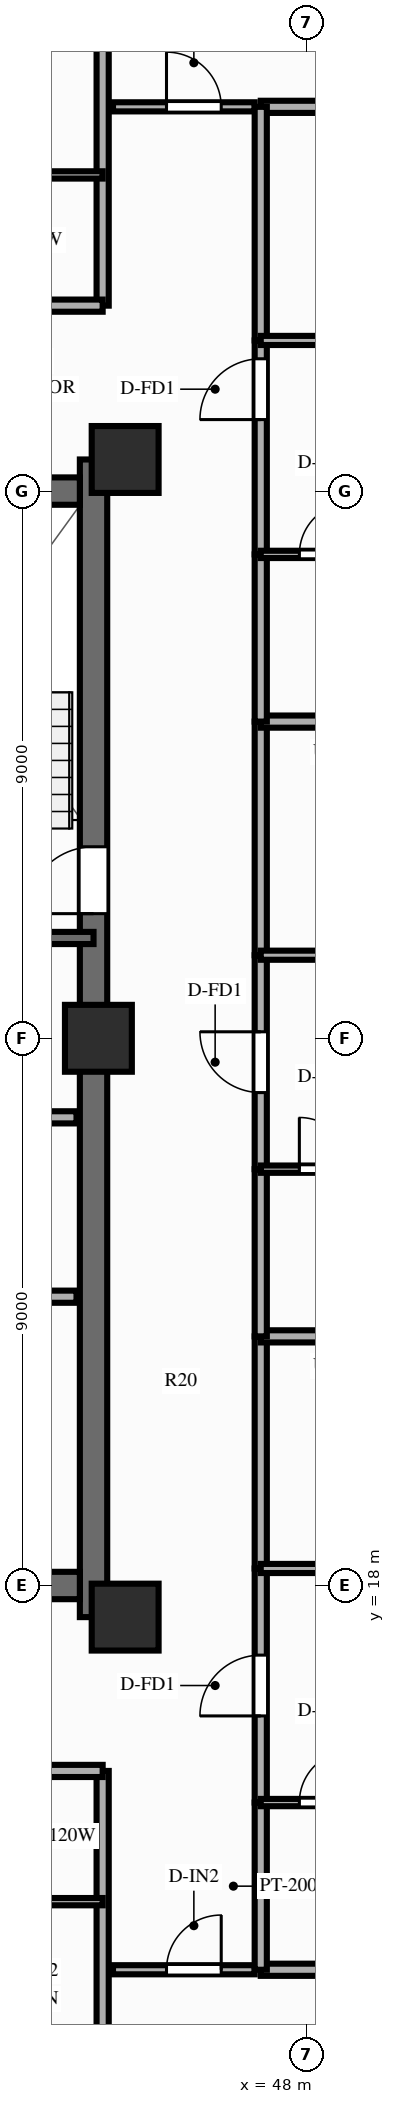
"""IFC4 building model, lengths in metres.
Left out: names, types, materials, properties, quantities, classifications, styles, units other than length and angle.
Written with IfcOpenShell. Run it as: python <this file> out.ifc"""

import sys

from ifc_helpers import new_model, si_unit, direction, frame, frame_2d, origin, origin_2d, place, context, subcontext, project, spatial, rectangle, extrude, source, transform, mapped, element, fill, save


model = new_model("IFC4")
c1 = context("Model", 3, precision=1e-05, world=origin(), true_north=direction((0.0, 1.0)))
c2 = subcontext(c1, "Body", "Model", "MODEL_VIEW")
j1 = project(units=[si_unit("LENGTHUNIT", "METRE"), si_unit("PLANEANGLEUNIT", "RADIAN")], contexts=[c1])
p1 = place(None, origin())
s1 = spatial("IfcSite", under=j1, at=p1, CompositionType="ELEMENT")
p2 = place(p1, origin())
s2 = spatial("IfcBuilding", under=s1, at=p2, CompositionType="ELEMENT")
p3 = place(p2, frame((0.0, 0.0, 196.6)))
s3 = spatial("IfcBuildingStorey", under=s2, at=p3, CompositionType="ELEMENT", Elevation=196.6)
p4 = place(p3, frame((44.5, 17.48, 0.0), z_axis=(0.0, 0.0, 1.0), x_axis=(0.0, 1.0, 0.0)))
e1 = element("IfcWall", 1, at=p4, inside=s3, PredefinedType="SHEAR", context=c2, shape_type="SweptSolid", body=[
    extrude(rectangle(XDim=19.04, YDim=0.45, at=frame_2d((9.52, 0.0))), origin(), (0.0, 0.0, 1.0), 3.0),
])
p5 = place(p4, frame((12.67, 0.0, 0.0), z_axis=(0.0, 0.0, 1.0), x_axis=(-1.0, 0.0, 0.0)))
e2 = element("IfcOpeningElement", 2, at=p5, cuts=e1, PredefinedType="OPENING", context=c2, shape_type="SweptSolid", body=[
    extrude(rectangle(XDim=1.1, YDim=2.15, at=frame_2d((0.55, 1.075))), frame((0.0, 0.237, 0.0), z_axis=(0.0, -1.0, 0.0), x_axis=(1.0, 0.0, 0.0)), (0.0, 0.0, 1.0), 0.474),
])
p6 = place(p3, frame((31.725, 18.0, 0.0), z_axis=(0.0, 0.0, 1.0), x_axis=(1.0, 0.0, 0.0)))
e3 = element("IfcWall", 3, at=p6, inside=s3, PredefinedType="SHEAR", context=c2, shape_type="SweptSolid", body=[
    extrude(rectangle(XDim=12.55, YDim=0.45, at=frame_2d((6.275, 0.0))), origin(), (0.0, 0.0, 1.0), 3.0),
])
p7 = place(p3, frame((31.725, 36.0, 0.0), z_axis=(0.0, 0.0, 1.0), x_axis=(1.0, 0.0, 0.0)))
e4 = element("IfcWall", 4, at=p7, inside=s3, PredefinedType="SHEAR", context=c2, shape_type="SweptSolid", body=[
    extrude(rectangle(XDim=12.55, YDim=0.45, at=frame_2d((6.275, 0.0))), origin(), (0.0, 0.0, 1.0), 3.0),
])
p8 = place(p7, frame((5.225, 0.0, 0.0), z_axis=(0.0, 0.0, 1.0), x_axis=(-1.0, 0.0, 0.0)))
e5 = element("IfcOpeningElement", 5, at=p8, cuts=e4, PredefinedType="OPENING", context=c2, shape_type="SweptSolid", body=[
    extrude(rectangle(XDim=1.4, YDim=2.15, at=frame_2d((0.7, 1.075))), frame((0.0, 0.237, 0.0), z_axis=(0.0, -1.0, 0.0), x_axis=(1.0, 0.0, 0.0)), (0.0, 0.0, 1.0), 0.474),
])
m1 = source(origin(), c2, "Body", "SweptSolid", [
    extrude(rectangle(XDim=1.1, YDim=1.1, at=origin_2d()), origin(), (0.0, 0.0, 1.0), 3.0),
])
for number, where, z_axis, x_axis in (
    (6, (45.02, 17.48, 0.0), (0.0, 0.0, 1.0), (1.0, 0.0, 0.0)),
    (7, (45.02, 36.52, 0.0), (0.0, 0.0, 1.0), (1.0, 0.0, 0.0)),
    (8, (44.58, 27.0, 0.0), (0.0, 0.0, 1.0), (1.0, 0.0, 0.0)),
):
    element("IfcColumn", number, at=place(p3, frame(where, z_axis=z_axis, x_axis=x_axis)), inside=s3, PredefinedType="COLUMN", context=c2, shape_type="MappedRepresentation", body=[
        mapped(m1, transform((0.0, 0.0, 0.0), scale=1.0)),
    ])
p9 = place(p3, frame((41.55, 22.75, 0.0), z_axis=(0.0, 0.0, 1.0), x_axis=(1.0, 0.0, 0.0)))
e9 = element("IfcWall", 9, at=p9, inside=s3, PredefinedType="PARTITIONING", context=c2, shape_type="SweptSolid", body=[
    extrude(rectangle(XDim=2.67, YDim=0.2, at=frame_2d((1.335, 0.0))), origin(), (0.0, 0.0, 1.0), 2.79),
])
p10 = place(p3, frame((41.55, 25.7, 0.0), z_axis=(0.0, 0.0, 1.0), x_axis=(1.0, 0.0, 0.0)))
e10 = element("IfcWall", 10, at=p10, inside=s3, PredefinedType="PARTITIONING", context=c2, shape_type="SweptSolid", body=[
    extrude(rectangle(XDim=2.67, YDim=0.2, at=frame_2d((1.335, 0.0))), origin(), (0.0, 0.0, 1.0), 2.14),
])
p11 = place(p3, frame((40.57, 28.65, 0.0), z_axis=(0.0, 0.0, 1.0), x_axis=(1.0, 0.0, 0.0)))
e11 = element("IfcWall", 11, at=p11, inside=s3, PredefinedType="SOLIDWALL", context=c2, shape_type="SweptSolid", body=[
    extrude(rectangle(XDim=3.93, YDim=0.2, at=frame_2d((1.965, 0.0))), origin(), (0.0, 0.0, 1.0), 2.79),
])
p12 = place(p3, frame((44.82, 11.68, 0.0), z_axis=(0.0, 0.0, 1.0), x_axis=(1.0, 0.0, 0.0)))
e12 = element("IfcWall", 12, at=p12, inside=s3, PredefinedType="PARTITIONING", context=c2, shape_type="SweptSolid", body=[
    extrude(rectangle(XDim=2.33, YDim=0.15, at=frame_2d((1.165, 0.0))), origin(), (0.0, 0.0, 1.0), 2.79),
])
p13 = place(p12, frame((0.88, 0.0, 0.0)))
e13 = element("IfcOpeningElement", 13, at=p13, cuts=e12, PredefinedType="OPENING", context=c2, shape_type="SweptSolid", body=[
    extrude(rectangle(XDim=0.9, YDim=2.1, at=frame_2d((0.45, 1.05))), frame((0.0, 0.087, 0.0), z_axis=(0.0, -1.0, 0.0), x_axis=(1.0, 0.0, 0.0)), (0.0, 0.0, 1.0), 0.174),
])
p14 = place(p3, frame((44.82, 42.32, 0.0), z_axis=(0.0, 0.0, 1.0), x_axis=(1.0, 0.0, 0.0)))
e14 = element("IfcWall", 14, at=p14, inside=s3, PredefinedType="PARTITIONING", context=c2, shape_type="SweptSolid", body=[
    extrude(rectangle(XDim=2.33, YDim=0.15, at=frame_2d((1.165, 0.0))), origin(), (0.0, 0.0, 1.0), 2.79),
])
p15 = place(p14, frame((0.88, 0.0, 0.0)))
e15 = element("IfcOpeningElement", 15, at=p15, cuts=e14, PredefinedType="OPENING", context=c2, shape_type="SweptSolid", body=[
    extrude(rectangle(XDim=0.9, YDim=2.1, at=frame_2d((0.45, 1.05))), frame((0.0, 0.087, 0.0), z_axis=(0.0, -1.0, 0.0), x_axis=(1.0, 0.0, 0.0)), (0.0, 0.0, 1.0), 0.174),
])
p16 = place(p3, frame((44.65, 14.95, 0.0), z_axis=(0.0, 0.0, 1.0), x_axis=(0.0, -1.0, 0.0)))
e16 = element("IfcWall", 16, at=p16, inside=s3, PredefinedType="PARTITIONING", context=c2, shape_type="SweptSolid", body=[
    extrude(rectangle(XDim=8.8, YDim=0.2, at=frame_2d((4.4, 0.0))), origin(), (0.0, 0.0, 1.0), 2.39),
])
p17 = place(p3, frame((41.8, 14.95, 0.0), z_axis=(0.0, 0.0, 1.0), x_axis=(1.0, 0.0, 0.0)))
e17 = element("IfcWall", 17, at=p17, inside=s3, PredefinedType="PARTITIONING", context=c2, shape_type="SweptSolid", body=[
    extrude(rectangle(XDim=2.85, YDim=0.2, at=frame_2d((1.425, 0.0))), origin(), (0.0, 0.0, 1.0), 2.79),
])
p18 = place(p3, frame((41.8, 12.8, 0.0), z_axis=(0.0, 0.0, 1.0), x_axis=(1.0, 0.0, 0.0)))
e18 = element("IfcWall", 18, at=p18, inside=s3, PredefinedType="PARTITIONING", context=c2, shape_type="SweptSolid", body=[
    extrude(rectangle(XDim=2.85, YDim=0.12, at=frame_2d((1.425, 0.0))), origin(), (0.0, 0.0, 1.0), 2.79),
])
p19 = place(p3, frame((44.65, 39.05, 0.0), z_axis=(0.0, 0.0, 1.0), x_axis=(0.0, 1.0, 0.0)))
e19 = element("IfcWall", 19, at=p19, inside=s3, PredefinedType="PARTITIONING", context=c2, shape_type="SweptSolid", body=[
    extrude(rectangle(XDim=8.8, YDim=0.2, at=frame_2d((4.4, 0.0))), origin(), (0.0, 0.0, 1.0), 2.39),
])
p20 = place(p3, frame((42.085, 39.05, 0.0), z_axis=(0.0, 0.0, 1.0), x_axis=(1.0, 0.0, 0.0)))
e20 = element("IfcWall", 20, at=p20, inside=s3, PredefinedType="PARTITIONING", context=c2, shape_type="SweptSolid", body=[
    extrude(rectangle(XDim=2.564, YDim=0.2, at=frame_2d((1.282, 0.0))), origin(), (0.0, 0.0, 1.0), 2.79),
])
p21 = place(p3, frame((42.085, 41.2, 0.0), z_axis=(0.0, 0.0, 1.0), x_axis=(1.0, 0.0, 0.0)))
e21 = element("IfcWall", 21, at=p21, inside=s3, PredefinedType="PARTITIONING", context=c2, shape_type="SweptSolid", body=[
    extrude(rectangle(XDim=2.564, YDim=0.12, at=frame_2d((1.282, 0.0))), origin(), (0.0, 0.0, 1.0), 2.79),
])
for number, where, z_axis, x_axis in (
    (22, (47.25, 11.68, 0.0), (0.0, 0.0, 1.0), (1.0, 0.0, 0.0)),
    (23, (47.25, 42.32, 0.0), (0.0, 0.0, 1.0), (1.0, 0.0, 0.0)),
):
    element("IfcWall", number, at=place(p3, frame(where, z_axis=z_axis, x_axis=x_axis)), inside=s3, PredefinedType="PARTITIONING", context=c2, shape_type="SweptSolid", body=[
        extrude(rectangle(XDim=9.1, YDim=0.2, at=frame_2d((4.55, 0.0))), origin(), (0.0, 0.0, 1.0), 2.79),
    ])
p22 = place(p3, frame((47.25, 11.68, 0.0), z_axis=(0.0, 0.0, 1.0), x_axis=(0.0, 1.0, 0.0)))
e24 = element("IfcWall", 24, at=p22, inside=s3, PredefinedType="PARTITIONING", context=c2, shape_type="SweptSolid", body=[
    extrude(rectangle(XDim=2.75, YDim=0.2, at=frame_2d((1.375, 0.0))), origin(), (0.0, 0.0, 1.0), 2.79),
])
p23 = place(p3, frame((47.25, 14.43, 0.0), z_axis=(0.0, 0.0, 1.0), x_axis=(0.0, 1.0, 0.0)))
e25 = element("IfcWall", 25, at=p23, inside=s3, PredefinedType="PARTITIONING", context=c2, shape_type="SweptSolid", body=[
    extrude(rectangle(XDim=3.85, YDim=0.2, at=frame_2d((1.925, 0.0))), origin(), (0.0, 0.0, 1.0), 2.79),
])
p24 = place(p23, frame((1.425, 0.0, 0.0)))
e26 = element("IfcOpeningElement", 26, at=p24, cuts=e25, PredefinedType="OPENING", context=c2, shape_type="SweptSolid", body=[
    extrude(rectangle(XDim=1.0, YDim=2.15, at=frame_2d((0.5, 1.075))), frame((0.0, 0.112, 0.0), z_axis=(0.0, -1.0, 0.0), x_axis=(1.0, 0.0, 0.0)), (0.0, 0.0, 1.0), 0.224),
])
p25 = place(p3, frame((47.25, 18.28, 0.0), z_axis=(0.0, 0.0, 1.0), x_axis=(0.0, 1.0, 0.0)))
e27 = element("IfcWall", 27, at=p25, inside=s3, PredefinedType="PARTITIONING", context=c2, shape_type="SweptSolid", body=[
    extrude(rectangle(XDim=3.818, YDim=0.2, at=frame_2d((1.909, 0.0))), origin(), (0.0, 0.0, 1.0), 2.79),
])
p26 = place(p3, frame((47.25, 14.43, 0.0), z_axis=(0.0, 0.0, 1.0), x_axis=(1.0, 0.0, 0.0)))
e28 = element("IfcWall", 28, at=p26, inside=s3, PredefinedType="PARTITIONING", context=c2, shape_type="SweptSolid", body=[
    extrude(rectangle(XDim=2.12, YDim=0.12, at=frame_2d((1.06, 0.0))), origin(), (0.0, 0.0, 1.0), 2.79),
])
p27 = place(p26, frame((0.635, 0.0, 0.0)))
e29 = element("IfcOpeningElement", 29, at=p27, cuts=e28, PredefinedType="OPENING", context=c2, shape_type="SweptSolid", body=[
    extrude(rectangle(XDim=0.85, YDim=2.05, at=frame_2d((0.425, 1.025))), frame((0.0, 0.072, 0.0), z_axis=(0.0, -1.0, 0.0), x_axis=(1.0, 0.0, 0.0)), (0.0, 0.0, 1.0), 0.144),
])
p28 = place(p3, frame((47.25, 18.28, 0.0), z_axis=(0.0, 0.0, 1.0), x_axis=(1.0, 0.0, 0.0)))
e30 = element("IfcWall", 30, at=p28, inside=s3, PredefinedType="PARTITIONING", context=c2, shape_type="SweptSolid", body=[
    extrude(rectangle(XDim=3.08, YDim=0.15, at=frame_2d((1.54, 0.0))), origin(), (0.0, 0.0, 1.0), 2.79),
])
p29 = place(p28, frame((1.09, 0.0, 0.0)))
e31 = element("IfcOpeningElement", 31, at=p29, cuts=e30, PredefinedType="OPENING", context=c2, shape_type="SweptSolid", body=[
    extrude(rectangle(XDim=0.9, YDim=2.1, at=frame_2d((0.45, 1.05))), frame((0.0, 0.087, 0.0), z_axis=(0.0, -1.0, 0.0), x_axis=(1.0, 0.0, 0.0)), (0.0, 0.0, 1.0), 0.174),
])
p30 = place(p3, frame((47.25, 22.098, 0.0), z_axis=(0.0, 0.0, 1.0), x_axis=(1.0, 0.0, 0.0)))
e32 = element("IfcWall", 32, at=p30, inside=s3, PredefinedType="PARTITIONING", context=c2, shape_type="SweptSolid", body=[
    extrude(rectangle(XDim=9.1, YDim=0.2, at=frame_2d((4.55, 0.0))), origin(), (0.0, 0.0, 1.0), 2.39),
])
p31 = place(p3, frame((47.25, 22.098, 0.0), z_axis=(0.0, 0.0, 1.0), x_axis=(0.0, 1.0, 0.0)))
e33 = element("IfcWall", 33, at=p31, inside=s3, PredefinedType="PARTITIONING", context=c2, shape_type="SweptSolid", body=[
    extrude(rectangle(XDim=2.75, YDim=0.2, at=frame_2d((1.375, 0.0))), origin(), (0.0, 0.0, 1.0), 2.79),
])
p32 = place(p3, frame((47.25, 24.848, 0.0), z_axis=(0.0, 0.0, 1.0), x_axis=(0.0, 1.0, 0.0)))
e34 = element("IfcWall", 34, at=p32, inside=s3, PredefinedType="PARTITIONING", context=c2, shape_type="SweptSolid", body=[
    extrude(rectangle(XDim=3.519, YDim=0.2, at=frame_2d((1.759, 0.0))), origin(), (0.0, 0.0, 1.0), 2.79),
])
p33 = place(p32, frame((1.26, 0.0, 0.0)))
e35 = element("IfcOpeningElement", 35, at=p33, cuts=e34, PredefinedType="OPENING", context=c2, shape_type="SweptSolid", body=[
    extrude(rectangle(XDim=1.0, YDim=2.15, at=frame_2d((0.5, 1.075))), frame((0.0, 0.112, 0.0), z_axis=(0.0, -1.0, 0.0), x_axis=(1.0, 0.0, 0.0)), (0.0, 0.0, 1.0), 0.224),
])
p34 = place(p3, frame((47.25, 28.366, 0.0), z_axis=(0.0, 0.0, 1.0), x_axis=(0.0, 1.0, 0.0)))
e36 = element("IfcWall", 36, at=p34, inside=s3, PredefinedType="PARTITIONING", context=c2, shape_type="SweptSolid", body=[
    extrude(rectangle(XDim=3.842, YDim=0.2, at=frame_2d((1.921, 0.0))), origin(), (0.0, 0.0, 1.0), 2.79),
])
p35 = place(p3, frame((47.25, 24.848, 0.0), z_axis=(0.0, 0.0, 1.0), x_axis=(1.0, 0.0, 0.0)))
e37 = element("IfcWall", 37, at=p35, inside=s3, PredefinedType="PARTITIONING", context=c2, shape_type="SweptSolid", body=[
    extrude(rectangle(XDim=2.12, YDim=0.12, at=frame_2d((1.06, 0.0))), origin(), (0.0, 0.0, 1.0), 2.79),
])
p36 = place(p35, frame((0.635, 0.0, 0.0)))
e38 = element("IfcOpeningElement", 38, at=p36, cuts=e37, PredefinedType="OPENING", context=c2, shape_type="SweptSolid", body=[
    extrude(rectangle(XDim=0.85, YDim=2.05, at=frame_2d((0.425, 1.025))), frame((0.0, 0.072, 0.0), z_axis=(0.0, -1.0, 0.0), x_axis=(1.0, 0.0, 0.0)), (0.0, 0.0, 1.0), 0.144),
])
p37 = place(p3, frame((47.25, 28.366, 0.0), z_axis=(0.0, 0.0, 1.0), x_axis=(1.0, 0.0, 0.0)))
e39 = element("IfcWall", 39, at=p37, inside=s3, PredefinedType="PARTITIONING", context=c2, shape_type="SweptSolid", body=[
    extrude(rectangle(XDim=3.08, YDim=0.15, at=frame_2d((1.54, 0.0))), origin(), (0.0, 0.0, 1.0), 2.79),
])
p38 = place(p37, frame((1.09, 0.0, 0.0)))
e40 = element("IfcOpeningElement", 40, at=p38, cuts=e39, PredefinedType="OPENING", context=c2, shape_type="SweptSolid", body=[
    extrude(rectangle(XDim=0.9, YDim=2.1, at=frame_2d((0.45, 1.05))), frame((0.0, 0.087, 0.0), z_axis=(0.0, -1.0, 0.0), x_axis=(1.0, 0.0, 0.0)), (0.0, 0.0, 1.0), 0.174),
])
p39 = place(p3, frame((47.25, 32.209, 0.0), z_axis=(0.0, 0.0, 1.0), x_axis=(1.0, 0.0, 0.0)))
e41 = element("IfcWall", 41, at=p39, inside=s3, PredefinedType="PARTITIONING", context=c2, shape_type="SweptSolid", body=[
    extrude(rectangle(XDim=9.1, YDim=0.2, at=frame_2d((4.55, 0.0))), origin(), (0.0, 0.0, 1.0), 2.39),
])
p40 = place(p3, frame((47.25, 32.209, 0.0), z_axis=(0.0, 0.0, 1.0), x_axis=(0.0, 1.0, 0.0)))
e42 = element("IfcWall", 42, at=p40, inside=s3, PredefinedType="PARTITIONING", context=c2, shape_type="SweptSolid", body=[
    extrude(rectangle(XDim=2.75, YDim=0.2, at=frame_2d((1.375, 0.0))), origin(), (0.0, 0.0, 1.0), 2.79),
])
p41 = place(p3, frame((47.25, 34.959, 0.0), z_axis=(0.0, 0.0, 1.0), x_axis=(0.0, 1.0, 0.0)))
e43 = element("IfcWall", 43, at=p41, inside=s3, PredefinedType="PARTITIONING", context=c2, shape_type="SweptSolid", body=[
    extrude(rectangle(XDim=3.519, YDim=0.2, at=frame_2d((1.76, 0.0))), origin(), (0.0, 0.0, 1.0), 2.79),
])
p42 = place(p41, frame((2.217, 0.0, 0.0)))
e44 = element("IfcOpeningElement", 44, at=p42, cuts=e43, PredefinedType="OPENING", context=c2, shape_type="SweptSolid", body=[
    extrude(rectangle(XDim=1.0, YDim=2.15, at=frame_2d((0.5, 1.075))), frame((0.0, 0.112, 0.0), z_axis=(0.0, -1.0, 0.0), x_axis=(1.0, 0.0, 0.0)), (0.0, 0.0, 1.0), 0.224),
])
p43 = place(p3, frame((47.25, 38.478, 0.0), z_axis=(0.0, 0.0, 1.0), x_axis=(0.0, 1.0, 0.0)))
e45 = element("IfcWall", 45, at=p43, inside=s3, PredefinedType="PARTITIONING", context=c2, shape_type="SweptSolid", body=[
    extrude(rectangle(XDim=3.842, YDim=0.2, at=frame_2d((1.921, 0.0))), origin(), (0.0, 0.0, 1.0), 2.79),
])
p44 = place(p3, frame((47.25, 34.959, 0.0), z_axis=(0.0, 0.0, 1.0), x_axis=(1.0, 0.0, 0.0)))
e46 = element("IfcWall", 46, at=p44, inside=s3, PredefinedType="PARTITIONING", context=c2, shape_type="SweptSolid", body=[
    extrude(rectangle(XDim=2.12, YDim=0.12, at=frame_2d((1.06, 0.0))), origin(), (0.0, 0.0, 1.0), 2.79),
])
p45 = place(p44, frame((0.635, 0.0, 0.0)))
e47 = element("IfcOpeningElement", 47, at=p45, cuts=e46, PredefinedType="OPENING", context=c2, shape_type="SweptSolid", body=[
    extrude(rectangle(XDim=0.85, YDim=2.05, at=frame_2d((0.425, 1.025))), frame((0.0, 0.072, 0.0), z_axis=(0.0, -1.0, 0.0), x_axis=(1.0, 0.0, 0.0)), (0.0, 0.0, 1.0), 0.144),
])
p46 = place(p3, frame((47.25, 38.478, 0.0), z_axis=(0.0, 0.0, 1.0), x_axis=(1.0, 0.0, 0.0)))
e48 = element("IfcWall", 48, at=p46, inside=s3, PredefinedType="PARTITIONING", context=c2, shape_type="SweptSolid", body=[
    extrude(rectangle(XDim=3.08, YDim=0.15, at=frame_2d((1.54, 0.0))), origin(), (0.0, 0.0, 1.0), 2.79),
])
p47 = place(p46, frame((1.09, 0.0, 0.0)))
e49 = element("IfcOpeningElement", 49, at=p47, cuts=e48, PredefinedType="OPENING", context=c2, shape_type="SweptSolid", body=[
    extrude(rectangle(XDim=0.9, YDim=2.1, at=frame_2d((0.45, 1.05))), frame((0.0, 0.087, 0.0), z_axis=(0.0, -1.0, 0.0), x_axis=(1.0, 0.0, 0.0)), (0.0, 0.0, 1.0), 0.174),
])
m2 = source(origin(), c2, "Body", "SweptSolid", [
    extrude(rectangle(XDim=1.1, YDim=2.15, at=frame_2d((0.55, 1.075))), frame((0.0, 0.025, 0.0), z_axis=(0.0, -1.0, 0.0), x_axis=(1.0, 0.0, 0.0)), (0.0, 0.0, 1.0), 0.05),
])
p48 = place(p5, origin())
e50 = element("IfcDoor", 50, at=p48, inside=s3, OperationType="SINGLE_SWING_RIGHT", PredefinedType="DOOR", context=c2, shape_type="MappedRepresentation", body=[
    mapped(m2, transform((0.0, 0.0, 0.0), scale=1.0)),
])
fill(e2, e50)
m3 = source(origin(), c2, "Body", "SweptSolid", [
    extrude(rectangle(XDim=0.9, YDim=2.1, at=frame_2d((0.45, 1.05))), frame((0.0, 0.025, 0.0), z_axis=(0.0, -1.0, 0.0), x_axis=(1.0, 0.0, 0.0)), (0.0, 0.0, 1.0), 0.05),
])
p49 = place(p13, origin())
e51 = element("IfcDoor", 51, at=p49, inside=s3, OperationType="SINGLE_SWING_RIGHT", PredefinedType="DOOR", context=c2, shape_type="MappedRepresentation", body=[
    mapped(m3, transform((0.0, 0.0, 0.0), scale=1.0)),
])
fill(e13, e51)
p50 = place(p15, origin())
e52 = element("IfcDoor", 52, at=p50, inside=s3, OperationType="SINGLE_SWING_LEFT", PredefinedType="DOOR", context=c2, shape_type="MappedRepresentation", body=[
    mapped(m3, transform((0.0, 0.0, 0.0), scale=1.0)),
])
fill(e15, e52)
m4 = source(origin(), c2, "Body", "SweptSolid", [
    extrude(rectangle(XDim=1.0, YDim=2.15, at=frame_2d((0.5, 1.075))), frame((0.0, 0.025, 0.0), z_axis=(0.0, -1.0, 0.0), x_axis=(1.0, 0.0, 0.0)), (0.0, 0.0, 1.0), 0.05),
])
p51 = place(p24, origin())
e53 = element("IfcDoor", 53, at=p51, inside=s3, OperationType="SINGLE_SWING_LEFT", PredefinedType="DOOR", context=c2, shape_type="MappedRepresentation", body=[
    mapped(m4, transform((0.0, 0.0, 0.0), scale=1.0)),
])
fill(e26, e53)
m5 = source(origin(), c2, "Body", "SweptSolid", [
    extrude(rectangle(XDim=0.85, YDim=2.05, at=frame_2d((0.425, 1.025))), frame((0.0, 0.025, 0.0), z_axis=(0.0, -1.0, 0.0), x_axis=(1.0, 0.0, 0.0)), (0.0, 0.0, 1.0), 0.05),
])
p52 = place(p27, origin())
e54 = element("IfcDoor", 54, at=p52, inside=s3, OperationType="SINGLE_SWING_RIGHT", PredefinedType="DOOR", context=c2, shape_type="MappedRepresentation", body=[
    mapped(m5, transform((0.0, 0.0, 0.0), scale=1.0)),
])
fill(e29, e54)
p53 = place(p33, origin())
e55 = element("IfcDoor", 55, at=p53, inside=s3, OperationType="SINGLE_SWING_RIGHT", PredefinedType="DOOR", context=c2, shape_type="MappedRepresentation", body=[
    mapped(m4, transform((0.0, 0.0, 0.0), scale=1.0)),
])
fill(e35, e55)
p54 = place(p36, origin())
e56 = element("IfcDoor", 56, at=p54, inside=s3, OperationType="SINGLE_SWING_LEFT", PredefinedType="DOOR", context=c2, shape_type="MappedRepresentation", body=[
    mapped(m5, transform((0.0, 0.0, 0.0), scale=1.0)),
])
fill(e38, e56)
p55 = place(p42, origin())
e57 = element("IfcDoor", 57, at=p55, inside=s3, OperationType="SINGLE_SWING_LEFT", PredefinedType="DOOR", context=c2, shape_type="MappedRepresentation", body=[
    mapped(m4, transform((0.0, 0.0, 0.0), scale=1.0)),
])
fill(e44, e57)
p56 = place(p45, origin())
e58 = element("IfcDoor", 58, at=p56, inside=s3, OperationType="SINGLE_SWING_RIGHT", PredefinedType="DOOR", context=c2, shape_type="MappedRepresentation", body=[
    mapped(m5, transform((0.0, 0.0, 0.0), scale=1.0)),
])
fill(e47, e58)
save(model, sys.argv[1])
